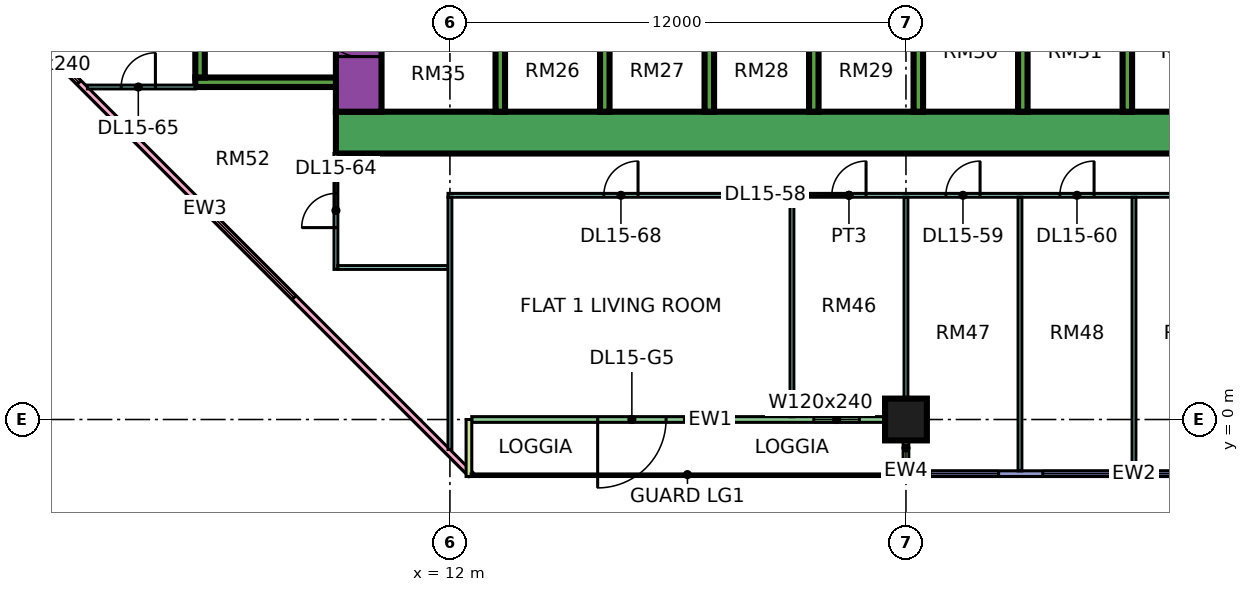
"""IFC4 building model, lengths in metres.
Left out: names, types, materials, properties, quantities, classifications, styles, units other than length and angle.
Written with IfcOpenShell. Run it as: python <this file> out.ifc"""

import sys

from ifc_helpers import new_model, si_unit, direction, frame, frame_2d, origin, origin_2d, place, context, subcontext, project, spatial, rectangle, extrude, element, fill, save


model = new_model("IFC4")
c1 = context("Model", 3, precision=1e-05, world=origin(), true_north=direction((0.0, 1.0)))
c2 = subcontext(c1, "Body", "Model", "MODEL_VIEW")
j1 = project(units=[si_unit("LENGTHUNIT", "METRE"), si_unit("PLANEANGLEUNIT", "RADIAN")], contexts=[c1])
p1 = place(None, origin())
s1 = spatial("IfcSite", under=j1, at=p1, CompositionType="ELEMENT")
p2 = place(p1, origin())
s2 = spatial("IfcBuilding", under=s1, at=p2, CompositionType="ELEMENT")
p3 = place(p2, frame((0.0, 0.0, 71.4)))
s3 = spatial("IfcBuildingStorey", under=s2, at=p3, CompositionType="ELEMENT", Elevation=71.4)
p4 = place(p3, frame((24.0, 0.0, 0.0), z_axis=(0.0, 0.0, 1.0), x_axis=(1.0, 0.0, 0.0)))
e1 = element("IfcColumn", 1, at=p4, inside=s3, PredefinedType="COLUMN", context=c2, shape_type="SweptSolid", body=[
    extrude(rectangle(XDim=1.1, YDim=1.1, at=origin_2d()), origin(), (0.0, 0.0, 1.0), 3.75),
])
p5 = place(p3, frame((9.0, 7.55, 0.0), z_axis=(0.0, 0.0, 1.0), x_axis=(1.0, 0.0, 0.0)))
e2 = element("IfcWall", 2, at=p5, inside=s3, PredefinedType="SHEAR", context=c2, shape_type="SweptSolid", body=[
    extrude(rectangle(XDim=25.0, YDim=1.1, at=frame_2d((12.5, 0.0))), origin(), (0.0, 0.0, 1.0), 3.75),
])
p6 = place(p3, frame((9.6, 8.1, 0.0), z_axis=(0.0, 0.0, 1.0), x_axis=(0.0, 1.0, 0.0)))
e3 = element("IfcWall", 3, at=p6, inside=s3, PredefinedType="SHEAR", context=c2, shape_type="SweptSolid", body=[
    extrude(rectangle(XDim=10.8, YDim=1.2, at=frame_2d((5.4, 0.0))), origin(), (0.0, 0.0, 1.0), 3.75),
])
p7 = place(p6, frame((3.775, 0.0, 0.0)))
e4 = element("IfcOpeningElement", 4, at=p7, cuts=e3, PredefinedType="OPENING", context=c2, shape_type="SweptSolid", body=[
    extrude(rectangle(XDim=1.1, YDim=2.2, at=frame_2d((0.55, 1.1))), frame((0.0, 0.61, 0.0), z_axis=(0.0, -1.0, 0.0), x_axis=(1.0, 0.0, 0.0)), (0.0, 0.0, 1.0), 1.22),
])
p8 = place(p6, frame((6.275, 0.0, 0.0)))
e5 = element("IfcOpeningElement", 5, at=p8, cuts=e3, PredefinedType="OPENING", context=c2, shape_type="SweptSolid", body=[
    extrude(rectangle(XDim=1.1, YDim=2.2, at=frame_2d((0.55, 1.1))), frame((0.0, 0.61, 0.0), z_axis=(0.0, -1.0, 0.0), x_axis=(1.0, 0.0, 0.0)), (0.0, 0.0, 1.0), 1.22),
])
p9 = place(p6, frame((8.95, 0.0, 0.0)))
e6 = element("IfcOpeningElement", 6, at=p9, cuts=e3, PredefinedType="OPENING", context=c2, shape_type="SweptSolid", body=[
    extrude(rectangle(XDim=1.1, YDim=2.2, at=frame_2d((0.55, 1.1))), frame((0.0, 0.61, 0.0), z_axis=(0.0, -1.0, 0.0), x_axis=(1.0, 0.0, 0.0)), (0.0, 0.0, 1.0), 1.22),
])
p10 = place(p6, frame((1.45, 0.0, 0.0)))
e7 = element("IfcOpeningElement", 7, at=p10, cuts=e3, PredefinedType="OPENING", context=c2, shape_type="SweptSolid", body=[
    extrude(rectangle(XDim=0.9, YDim=2.1, at=frame_2d((0.45, 1.05))), frame((0.0, 0.61, 0.0), z_axis=(0.0, -1.0, 0.0), x_axis=(1.0, 0.0, 0.0)), (0.0, 0.0, 1.0), 1.22),
])
p11 = place(p3, frame((13.325, 8.1, 0.0), z_axis=(0.0, 0.0, 1.0), x_axis=(0.0, 1.0, 0.0)))
e8 = element("IfcWall", 8, at=p11, inside=s3, PredefinedType="SHEAR", context=c2, shape_type="SweptSolid", body=[
    extrude(rectangle(XDim=10.8, YDim=0.25, at=frame_2d((5.4, 0.0))), origin(), (0.0, 0.0, 1.0), 3.75),
])
for number, where, z_axis, x_axis in (
    (9, (16.075, 8.1, 0.0), (0.0, 0.0, 1.0), (0.0, 1.0, 0.0)),
    (10, (18.825, 8.1, 0.0), (0.0, 0.0, 1.0), (0.0, 1.0, 0.0)),
    (11, (21.575, 8.1, 0.0), (0.0, 0.0, 1.0), (0.0, 1.0, 0.0)),
    (12, (24.325, 8.1, 0.0), (0.0, 0.0, 1.0), (0.0, 1.0, 0.0)),
    (13, (27.075, 8.1, 0.0), (0.0, 0.0, 1.0), (0.0, 1.0, 0.0)),
    (14, (29.825, 8.1, 0.0), (0.0, 0.0, 1.0), (0.0, 1.0, 0.0)),
):
    element("IfcWall", number, at=place(p3, frame(where, z_axis=z_axis, x_axis=x_axis)), inside=s3, PredefinedType="SHEAR", context=c2, shape_type="SweptSolid", body=[
        extrude(rectangle(XDim=3.1, YDim=0.25, at=frame_2d((1.55, 0.0))), origin(), (0.0, 0.0, 1.0), 3.75),
    ])
p12 = place(p3, frame((5.3, 8.875, 0.0), z_axis=(0.0, 0.0, 1.0), x_axis=(1.0, 0.0, 0.0)))
e15 = element("IfcWall", 15, at=p12, inside=s3, PredefinedType="SHEAR", context=c2, shape_type="SweptSolid", body=[
    extrude(rectangle(XDim=3.7, YDim=0.25, at=frame_2d((1.85, 0.0))), origin(), (0.0, 0.0, 1.0), 3.75),
])
p13 = place(p3, frame((5.425, 9.0, 0.0), z_axis=(0.0, 0.0, 1.0), x_axis=(0.0, 1.0, 0.0)))
e16 = element("IfcWall", 16, at=p13, inside=s3, PredefinedType="SHEAR", context=c2, shape_type="SweptSolid", body=[
    extrude(rectangle(XDim=4.0, YDim=0.25, at=frame_2d((2.0, 0.0))), origin(), (0.0, 0.0, 1.0), 3.75),
])
p14 = place(p3, frame((-1.447, 12.553, 0.0), z_axis=(0.0, 0.0, 1.0), x_axis=(0.707106781187, -0.707106781187, 0.0)))
e17 = element("IfcWall", 17, at=p14, inside=s3, PredefinedType="SOLIDWALL", context=c2, shape_type="SweptSolid", body=[
    extrude(rectangle(XDim=19.799, YDim=0.15, at=frame_2d((9.899, 0.0))), origin(), (0.0, 0.0, 1.0), 3.35),
])
p15 = place(p14, frame((2.212, 0.0, 0.45)))
e18 = element("IfcOpeningElement", 18, at=p15, cuts=e17, PredefinedType="OPENING", context=c2, shape_type="SweptSolid", body=[
    extrude(rectangle(XDim=3.0, YDim=2.4, at=frame_2d((1.5, 1.2))), frame((0.0, 0.085, 0.0), z_axis=(0.0, -1.0, 0.0), x_axis=(1.0, 0.0, 0.0)), (0.0, 0.0, 1.0), 0.17),
])
p16 = place(p14, frame((10.216, 0.0, 0.45)))
e19 = element("IfcOpeningElement", 19, at=p16, cuts=e17, PredefinedType="OPENING", context=c2, shape_type="SweptSolid", body=[
    extrude(rectangle(XDim=3.0, YDim=2.4, at=frame_2d((1.5, 1.2))), frame((0.0, 0.085, 0.0), z_axis=(0.0, -1.0, 0.0), x_axis=(1.0, 0.0, 0.0)), (0.0, 0.0, 1.0), 0.17),
])
p17 = place(p3, frame((12.575, 0.0, 0.0), z_axis=(0.0, 0.0, 1.0), x_axis=(1.0, 0.0, 0.0)))
e20 = element("IfcWall", 20, at=p17, inside=s3, PredefinedType="SOLIDWALL", context=c2, shape_type="SweptSolid", body=[
    extrude(rectangle(XDim=11.35, YDim=0.15, at=frame_2d((5.675, 0.0))), origin(), (0.0, 0.0, 1.0), 3.35),
])
p18 = place(p17, frame((3.312, 0.0, 0.0)))
e21 = element("IfcOpeningElement", 21, at=p18, cuts=e20, PredefinedType="OPENING", context=c2, shape_type="SweptSolid", body=[
    extrude(rectangle(XDim=1.8, YDim=2.4, at=frame_2d((0.9, 1.2))), frame((0.0, 0.085, 0.0), z_axis=(0.0, -1.0, 0.0), x_axis=(1.0, 0.0, 0.0)), (0.0, 0.0, 1.0), 0.17),
])
p19 = place(p17, frame((9.0, 0.0, 0.45)))
e22 = element("IfcOpeningElement", 22, at=p19, cuts=e20, PredefinedType="OPENING", context=c2, shape_type="SweptSolid", body=[
    extrude(rectangle(XDim=1.2, YDim=2.4, at=frame_2d((0.6, 1.2))), frame((0.0, 0.085, 0.0), z_axis=(0.0, -1.0, 0.0), x_axis=(1.0, 0.0, 0.0)), (0.0, 0.0, 1.0), 0.17),
])
for number, where, z_axis, x_axis in (
    (23, (12.5, -1.5, 0.0), (0.0, 0.0, 1.0), (0.0, 1.0, 0.0)),
    (24, (24.0, -1.5, 0.0), (0.0, 0.0, 1.0), (0.0, 1.0, 0.0)),
):
    element("IfcWall", number, at=place(p3, frame(where, z_axis=z_axis, x_axis=x_axis)), inside=s3, PredefinedType="SOLIDWALL", context=c2, shape_type="SweptSolid", body=[
        extrude(rectangle(XDim=1.5, YDim=0.15, at=frame_2d((0.75, 0.0))), origin(), (0.0, 0.0, 1.0), 3.35),
    ])
p20 = place(p3, frame((24.075, -1.425, 0.0), z_axis=(0.0, 0.0, 1.0), x_axis=(1.0, 0.0, 0.0)))
e25 = element("IfcWall", 25, at=p20, inside=s3, PredefinedType="SOLIDWALL", context=c2, shape_type="SweptSolid", body=[
    extrude(rectangle(XDim=11.85, YDim=0.15, at=frame_2d((5.925, 0.0))), origin(), (0.0, 0.0, 1.0), 3.35),
])
p21 = place(p20, frame((0.562, 0.0, 0.45)))
e26 = element("IfcOpeningElement", 26, at=p21, cuts=e25, PredefinedType="OPENING", context=c2, shape_type="SweptSolid", body=[
    extrude(rectangle(XDim=1.8, YDim=2.4, at=frame_2d((0.9, 1.2))), frame((0.0, 0.085, 0.0), z_axis=(0.0, -1.0, 0.0), x_axis=(1.0, 0.0, 0.0)), (0.0, 0.0, 1.0), 0.17),
])
p22 = place(p20, frame((3.525, 0.0, 0.45)))
e27 = element("IfcOpeningElement", 27, at=p22, cuts=e25, PredefinedType="OPENING", context=c2, shape_type="SweptSolid", body=[
    extrude(rectangle(XDim=1.8, YDim=2.4, at=frame_2d((0.9, 1.2))), frame((0.0, 0.085, 0.0), z_axis=(0.0, -1.0, 0.0), x_axis=(1.0, 0.0, 0.0)), (0.0, 0.0, 1.0), 0.17),
])
p23 = place(p20, frame((6.525, 0.0, 0.45)))
e28 = element("IfcOpeningElement", 28, at=p23, cuts=e25, PredefinedType="OPENING", context=c2, shape_type="SweptSolid", body=[
    extrude(rectangle(XDim=1.8, YDim=2.4, at=frame_2d((0.9, 1.2))), frame((0.0, 0.085, 0.0), z_axis=(0.0, -1.0, 0.0), x_axis=(1.0, 0.0, 0.0)), (0.0, 0.0, 1.0), 0.17),
])
p24 = place(p20, frame((9.488, 0.0, 0.45)))
e29 = element("IfcOpeningElement", 29, at=p24, cuts=e25, PredefinedType="OPENING", context=c2, shape_type="SweptSolid", body=[
    extrude(rectangle(XDim=1.8, YDim=2.4, at=frame_2d((0.9, 1.2))), frame((0.0, 0.085, 0.0), z_axis=(0.0, -1.0, 0.0), x_axis=(1.0, 0.0, 0.0)), (0.0, 0.0, 1.0), 0.17),
])
p25 = place(p3, frame((2.461, 8.75, 0.0), z_axis=(0.0, 0.0, 1.0), x_axis=(1.0, 0.0, 0.0)))
e30 = element("IfcWall", 30, at=p25, inside=s3, PredefinedType="PARTITIONING", context=c2, shape_type="SweptSolid", body=[
    extrude(rectangle(XDim=2.839, YDim=0.1, at=frame_2d((1.419, 0.0))), origin(), (0.0, 0.0, 1.0), 3.35),
])
p26 = place(p25, frame((0.889, 0.0, 0.0)))
e31 = element("IfcOpeningElement", 31, at=p26, cuts=e30, PredefinedType="OPENING", context=c2, shape_type="SweptSolid", body=[
    extrude(rectangle(XDim=0.9, YDim=2.1, at=frame_2d((0.45, 1.05))), frame((0.0, 0.06, 0.0), z_axis=(0.0, -1.0, 0.0), x_axis=(1.0, 0.0, 0.0)), (0.0, 0.0, 1.0), 0.12),
])
p27 = place(p3, frame((9.0, 3.95, 0.0), z_axis=(0.0, 0.0, 1.0), x_axis=(0.0, 1.0, 0.0)))
e32 = element("IfcWall", 32, at=p27, inside=s3, PredefinedType="PARTITIONING", context=c2, shape_type="SweptSolid", body=[
    extrude(rectangle(XDim=3.05, YDim=0.1, at=frame_2d((1.525, 0.0))), origin(), (0.0, 0.0, 1.0), 3.35),
])
p28 = place(p27, frame((1.1, 0.0, 0.0)))
e33 = element("IfcOpeningElement", 33, at=p28, cuts=e32, PredefinedType="OPENING", context=c2, shape_type="SweptSolid", body=[
    extrude(rectangle(XDim=0.9, YDim=2.1, at=frame_2d((0.45, 1.05))), frame((0.0, 0.06, 0.0), z_axis=(0.0, -1.0, 0.0), x_axis=(1.0, 0.0, 0.0)), (0.0, 0.0, 1.0), 0.12),
])
p29 = place(p3, frame((9.05, 4.0, 0.0), z_axis=(0.0, 0.0, 1.0), x_axis=(1.0, 0.0, 0.0)))
e34 = element("IfcWall", 34, at=p29, inside=s3, PredefinedType="PARTITIONING", context=c2, shape_type="SweptSolid", body=[
    extrude(rectangle(XDim=2.9, YDim=0.1, at=frame_2d((1.45, 0.0))), origin(), (0.0, 0.0, 1.0), 3.35),
])
p30 = place(p3, frame((11.95, 5.9, 0.0), z_axis=(0.0, 0.0, 1.0), x_axis=(1.0, 0.0, 0.0)))
e35 = element("IfcWall", 35, at=p30, inside=s3, PredefinedType="PARTITIONING", context=c2, shape_type="SweptSolid", body=[
    extrude(rectangle(XDim=21.1, YDim=0.1, at=frame_2d((10.55, 0.0))), origin(), (0.0, 0.0, 1.0), 3.35),
])
p31 = place(p30, frame((10.1, 0.0, 0.0)))
e36 = element("IfcOpeningElement", 36, at=p31, cuts=e35, PredefinedType="OPENING", context=c2, shape_type="SweptSolid", body=[
    extrude(rectangle(XDim=0.9, YDim=2.1, at=frame_2d((0.45, 1.05))), frame((0.0, 0.06, 0.0), z_axis=(0.0, -1.0, 0.0), x_axis=(1.0, 0.0, 0.0)), (0.0, 0.0, 1.0), 0.12),
])
p32 = place(p30, frame((13.1, 0.0, 0.0)))
e37 = element("IfcOpeningElement", 37, at=p32, cuts=e35, PredefinedType="OPENING", context=c2, shape_type="SweptSolid", body=[
    extrude(rectangle(XDim=0.9, YDim=2.1, at=frame_2d((0.45, 1.05))), frame((0.0, 0.06, 0.0), z_axis=(0.0, -1.0, 0.0), x_axis=(1.0, 0.0, 0.0)), (0.0, 0.0, 1.0), 0.12),
])
p33 = place(p30, frame((16.1, 0.0, 0.0)))
e38 = element("IfcOpeningElement", 38, at=p33, cuts=e35, PredefinedType="OPENING", context=c2, shape_type="SweptSolid", body=[
    extrude(rectangle(XDim=0.9, YDim=2.1, at=frame_2d((0.45, 1.05))), frame((0.0, 0.06, 0.0), z_axis=(0.0, -1.0, 0.0), x_axis=(1.0, 0.0, 0.0)), (0.0, 0.0, 1.0), 0.12),
])
p34 = place(p30, frame((4.1, 0.0, 0.0)))
e39 = element("IfcOpeningElement", 39, at=p34, cuts=e35, PredefinedType="OPENING", context=c2, shape_type="SweptSolid", body=[
    extrude(rectangle(XDim=0.9, YDim=2.1, at=frame_2d((0.45, 1.05))), frame((0.0, 0.06, 0.0), z_axis=(0.0, -1.0, 0.0), x_axis=(1.0, 0.0, 0.0)), (0.0, 0.0, 1.0), 0.12),
])
p35 = place(p3, frame((12.0, -0.788, 0.0), z_axis=(0.0, 0.0, 1.0), x_axis=(0.0, 1.0, 0.0)))
e40 = element("IfcWall", 40, at=p35, inside=s3, PredefinedType="PARTITIONING", context=c2, shape_type="SweptSolid", body=[
    extrude(rectangle(XDim=6.638, YDim=0.1, at=frame_2d((3.319, 0.0))), origin(), (0.0, 0.0, 1.0), 3.35),
])
p36 = place(p3, frame((21.0, 0.074, 0.0), z_axis=(0.0, 0.0, 1.0), x_axis=(0.0, 1.0, 0.0)))
e41 = element("IfcWall", 41, at=p36, inside=s3, PredefinedType="PARTITIONING", context=c2, shape_type="SweptSolid", body=[
    extrude(rectangle(XDim=5.776, YDim=0.1, at=frame_2d((2.888, 0.0))), origin(), (0.0, 0.0, 1.0), 3.35),
])
p37 = place(p3, frame((24.0, 0.0, 0.0), z_axis=(0.0, 0.0, 1.0), x_axis=(0.0, 1.0, 0.0)))
e42 = element("IfcWall", 42, at=p37, inside=s3, PredefinedType="PARTITIONING", context=c2, shape_type="SweptSolid", body=[
    extrude(rectangle(XDim=5.85, YDim=0.1, at=frame_2d((2.925, 0.0))), origin(), (0.0, 0.0, 1.0), 3.35),
])
for number, where, z_axis, x_axis in (
    (43, (27.0, -1.351, 0.0), (0.0, 0.0, 1.0), (0.0, 1.0, 0.0)),
    (44, (30.0, -1.351, 0.0), (0.0, 0.0, 1.0), (0.0, 1.0, 0.0)),
):
    element("IfcWall", number, at=place(p3, frame(where, z_axis=z_axis, x_axis=x_axis)), inside=s3, PredefinedType="PARTITIONING", context=c2, shape_type="SweptSolid", body=[
        extrude(rectangle(XDim=7.201, YDim=0.1, at=frame_2d((3.601, 0.0))), origin(), (0.0, 0.0, 1.0), 3.35),
    ])
p38 = place(p15, origin())
e45 = element("IfcWindow", 45, at=p38, inside=s3, PartitioningType="SINGLE_PANEL", PredefinedType="WINDOW", context=c2, shape_type="SweptSolid", body=[
    extrude(rectangle(XDim=3.0, YDim=2.4, at=frame_2d((1.5, 1.2))), frame((0.0, 0.03, 0.0), z_axis=(0.0, -1.0, 0.0), x_axis=(1.0, 0.0, 0.0)), (0.0, 0.0, 1.0), 0.06),
])
fill(e18, e45)
p39 = place(p16, origin())
e46 = element("IfcWindow", 46, at=p39, inside=s3, PartitioningType="SINGLE_PANEL", PredefinedType="WINDOW", context=c2, shape_type="SweptSolid", body=[
    extrude(rectangle(XDim=3.0, YDim=2.4, at=frame_2d((1.5, 1.2))), frame((0.0, 0.03, 0.0), z_axis=(0.0, -1.0, 0.0), x_axis=(1.0, 0.0, 0.0)), (0.0, 0.0, 1.0), 0.06),
])
fill(e19, e46)
p40 = place(p18, frame((1.8, 0.0, 0.0), z_axis=(0.0, 0.0, 1.0), x_axis=(-1.0, 0.0, 0.0)))
e47 = element("IfcDoor", 47, at=p40, inside=s3, OperationType="DOUBLE_DOOR_SINGLE_SWING", PredefinedType="DOOR", context=c2, shape_type="SweptSolid", body=[
    extrude(rectangle(XDim=1.8, YDim=2.4, at=frame_2d((0.9, 1.2))), frame((0.0, 0.025, 0.0), z_axis=(0.0, -1.0, 0.0), x_axis=(1.0, 0.0, 0.0)), (0.0, 0.0, 1.0), 0.05),
])
fill(e21, e47)
p41 = place(p19, origin())
e48 = element("IfcWindow", 48, at=p41, inside=s3, PartitioningType="SINGLE_PANEL", PredefinedType="WINDOW", context=c2, shape_type="SweptSolid", body=[
    extrude(rectangle(XDim=1.2, YDim=2.4, at=frame_2d((0.6, 1.2))), frame((0.0, 0.03, 0.0), z_axis=(0.0, -1.0, 0.0), x_axis=(1.0, 0.0, 0.0)), (0.0, 0.0, 1.0), 0.06),
])
fill(e22, e48)
p42 = place(p21, origin())
e49 = element("IfcWindow", 49, at=p42, inside=s3, PartitioningType="SINGLE_PANEL", PredefinedType="WINDOW", context=c2, shape_type="SweptSolid", body=[
    extrude(rectangle(XDim=1.8, YDim=2.4, at=frame_2d((0.9, 1.2))), frame((0.0, 0.03, 0.0), z_axis=(0.0, -1.0, 0.0), x_axis=(1.0, 0.0, 0.0)), (0.0, 0.0, 1.0), 0.06),
])
fill(e26, e49)
p43 = place(p22, origin())
e50 = element("IfcWindow", 50, at=p43, inside=s3, PartitioningType="SINGLE_PANEL", PredefinedType="WINDOW", context=c2, shape_type="SweptSolid", body=[
    extrude(rectangle(XDim=1.8, YDim=2.4, at=frame_2d((0.9, 1.2))), frame((0.0, 0.03, 0.0), z_axis=(0.0, -1.0, 0.0), x_axis=(1.0, 0.0, 0.0)), (0.0, 0.0, 1.0), 0.06),
])
fill(e27, e50)
p44 = place(p23, origin())
e51 = element("IfcWindow", 51, at=p44, inside=s3, PartitioningType="SINGLE_PANEL", PredefinedType="WINDOW", context=c2, shape_type="SweptSolid", body=[
    extrude(rectangle(XDim=1.8, YDim=2.4, at=frame_2d((0.9, 1.2))), frame((0.0, 0.03, 0.0), z_axis=(0.0, -1.0, 0.0), x_axis=(1.0, 0.0, 0.0)), (0.0, 0.0, 1.0), 0.06),
])
fill(e28, e51)
p45 = place(p10, frame((0.9, 0.0, 0.0), z_axis=(0.0, 0.0, 1.0), x_axis=(-1.0, 0.0, 0.0)))
e52 = element("IfcDoor", 52, at=p45, inside=s3, OperationType="SINGLE_SWING_RIGHT", PredefinedType="DOOR", context=c2, shape_type="SweptSolid", body=[
    extrude(rectangle(XDim=0.9, YDim=2.1, at=frame_2d((0.45, 1.05))), frame((0.0, 0.025, 0.0), z_axis=(0.0, -1.0, 0.0), x_axis=(1.0, 0.0, 0.0)), (0.0, 0.0, 1.0), 0.05),
])
fill(e7, e52)
p46 = place(p31, frame((0.9, 0.0, 0.0), z_axis=(0.0, 0.0, 1.0), x_axis=(-1.0, 0.0, 0.0)))
e53 = element("IfcDoor", 53, at=p46, inside=s3, OperationType="SINGLE_SWING_RIGHT", PredefinedType="DOOR", context=c2, shape_type="SweptSolid", body=[
    extrude(rectangle(XDim=0.9, YDim=2.1, at=frame_2d((0.45, 1.05))), frame((0.0, 0.025, 0.0), z_axis=(0.0, -1.0, 0.0), x_axis=(1.0, 0.0, 0.0)), (0.0, 0.0, 1.0), 0.05),
])
fill(e36, e53)
p47 = place(p32, frame((0.9, 0.0, 0.0), z_axis=(0.0, 0.0, 1.0), x_axis=(-1.0, 0.0, 0.0)))
e54 = element("IfcDoor", 54, at=p47, inside=s3, OperationType="SINGLE_SWING_RIGHT", PredefinedType="DOOR", context=c2, shape_type="SweptSolid", body=[
    extrude(rectangle(XDim=0.9, YDim=2.1, at=frame_2d((0.45, 1.05))), frame((0.0, 0.025, 0.0), z_axis=(0.0, -1.0, 0.0), x_axis=(1.0, 0.0, 0.0)), (0.0, 0.0, 1.0), 0.05),
])
fill(e37, e54)
p48 = place(p33, frame((0.9, 0.0, 0.0), z_axis=(0.0, 0.0, 1.0), x_axis=(-1.0, 0.0, 0.0)))
e55 = element("IfcDoor", 55, at=p48, inside=s3, OperationType="SINGLE_SWING_RIGHT", PredefinedType="DOOR", context=c2, shape_type="SweptSolid", body=[
    extrude(rectangle(XDim=0.9, YDim=2.1, at=frame_2d((0.45, 1.05))), frame((0.0, 0.025, 0.0), z_axis=(0.0, -1.0, 0.0), x_axis=(1.0, 0.0, 0.0)), (0.0, 0.0, 1.0), 0.05),
])
fill(e38, e55)
p49 = place(p28, origin())
e56 = element("IfcDoor", 56, at=p49, inside=s3, OperationType="SINGLE_SWING_LEFT", PredefinedType="DOOR", context=c2, shape_type="SweptSolid", body=[
    extrude(rectangle(XDim=0.9, YDim=2.1, at=frame_2d((0.45, 1.05))), frame((0.0, 0.025, 0.0), z_axis=(0.0, -1.0, 0.0), x_axis=(1.0, 0.0, 0.0)), (0.0, 0.0, 1.0), 0.05),
])
fill(e33, e56)
p50 = place(p26, frame((0.9, 0.0, 0.0), z_axis=(0.0, 0.0, 1.0), x_axis=(-1.0, 0.0, 0.0)))
e57 = element("IfcDoor", 57, at=p50, inside=s3, OperationType="SINGLE_SWING_RIGHT", PredefinedType="DOOR", context=c2, shape_type="SweptSolid", body=[
    extrude(rectangle(XDim=0.9, YDim=2.1, at=frame_2d((0.45, 1.05))), frame((0.0, 0.025, 0.0), z_axis=(0.0, -1.0, 0.0), x_axis=(1.0, 0.0, 0.0)), (0.0, 0.0, 1.0), 0.05),
])
fill(e31, e57)
p51 = place(p34, frame((0.9, 0.0, 0.0), z_axis=(0.0, 0.0, 1.0), x_axis=(-1.0, 0.0, 0.0)))
e58 = element("IfcDoor", 58, at=p51, inside=s3, OperationType="SINGLE_SWING_RIGHT", PredefinedType="DOOR", context=c2, shape_type="SweptSolid", body=[
    extrude(rectangle(XDim=0.9, YDim=2.1, at=frame_2d((0.45, 1.05))), frame((0.0, 0.025, 0.0), z_axis=(0.0, -1.0, 0.0), x_axis=(1.0, 0.0, 0.0)), (0.0, 0.0, 1.0), 0.05),
])
fill(e39, e58)
save(model, sys.argv[1])
